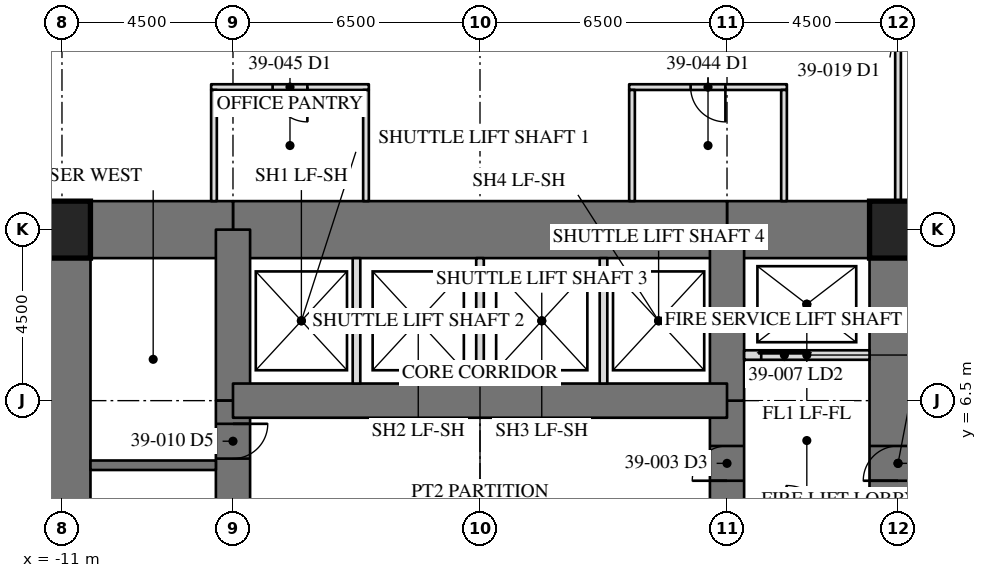
"""IFC4 building model, lengths in metres.
Left out: names, types, materials, properties, quantities, classifications, styles, units other than length and angle.
Written with IfcOpenShell. Run it as: python <this file> out.ifc"""

import sys

from ifc_helpers import new_model, si_unit, direction, frame, frame_2d, origin, origin_2d, place, context, subcontext, project, spatial, rectangle, hollow_rectangle, extrude, element, fill, save


model = new_model("IFC4")
c1 = context("Model", 3, precision=1e-05, world=origin(), true_north=direction((0.0, 1.0)))
c2 = subcontext(c1, "Body", "Model", "MODEL_VIEW")
j1 = project(units=[si_unit("LENGTHUNIT", "METRE"), si_unit("PLANEANGLEUNIT", "RADIAN")], contexts=[c1])
p1 = place(None, origin())
s1 = spatial("IfcSite", under=j1, at=p1, CompositionType="ELEMENT")
p2 = place(p1, origin())
s2 = spatial("IfcBuilding", under=s1, at=p2, CompositionType="ELEMENT")
p3 = place(p2, frame((0.0, 0.0, 166.4)))
s3 = spatial("IfcBuildingStorey", under=s2, at=p3, CompositionType="ELEMENT", Elevation=166.4)
p4 = place(p3, frame((11.0, -11.0, 0.0), z_axis=(0.0, 0.0, 1.0), x_axis=(0.0, 1.0, 0.0)))
e1 = element("IfcWall", 1, at=p4, inside=s3, PredefinedType="SHEAR", context=c2, shape_type="SweptSolid", body=[
    extrude(rectangle(XDim=22.0, YDim=1.5, at=frame_2d((11.0, 0.0))), origin(), (0.0, 0.0, 1.0), 4.1),
])
p5 = place(p4, frame((15.393, 0.0, 0.0)))
e2 = element("IfcOpeningElement", 2, at=p5, cuts=e1, PredefinedType="OPENING", context=c2, shape_type="SweptSolid", body=[
    extrude(rectangle(XDim=0.915, YDim=2.134, at=frame_2d((0.458, 1.067))), frame((0.0, 0.76, 0.0), z_axis=(0.0, -1.0, 0.0), x_axis=(1.0, 0.0, 0.0)), (0.0, 0.0, 1.0), 1.52),
])
p6 = place(p3, frame((-11.0, 11.0, 0.0), z_axis=(0.0, 0.0, 1.0), x_axis=(0.0, -1.0, 0.0)))
e3 = element("IfcWall", 3, at=p6, inside=s3, PredefinedType="SHEAR", context=c2, shape_type="SweptSolid", body=[
    extrude(rectangle(XDim=22.0, YDim=1.5, at=frame_2d((11.0, 0.0))), origin(), (0.0, 0.0, 1.0), 4.1),
])
p7 = place(p6, frame((15.393, 0.0, 0.0)))
e4 = element("IfcOpeningElement", 4, at=p7, cuts=e3, PredefinedType="OPENING", context=c2, shape_type="SweptSolid", body=[
    extrude(rectangle(XDim=0.915, YDim=2.134, at=frame_2d((0.458, 1.067))), frame((0.0, 0.76, 0.0), z_axis=(0.0, -1.0, 0.0), x_axis=(1.0, 0.0, 0.0)), (0.0, 0.0, 1.0), 1.52),
])
p8 = place(p3, frame((11.0, 11.0, 0.0), z_axis=(0.0, 0.0, 1.0), x_axis=(-1.0, 0.0, 0.0)))
e5 = element("IfcWall", 5, at=p8, inside=s3, PredefinedType="SHEAR", context=c2, shape_type="SweptSolid", body=[
    extrude(rectangle(XDim=4.5, YDim=1.5, at=frame_2d((2.25, 0.0))), origin(), (0.0, 0.0, 1.0), 4.1),
])
p9 = place(p3, frame((6.5, 11.0, 0.0), z_axis=(0.0, 0.0, 1.0), x_axis=(-1.0, 0.0, 0.0)))
e6 = element("IfcWall", 6, at=p9, inside=s3, PredefinedType="SHEAR", context=c2, shape_type="SweptSolid", body=[
    extrude(rectangle(XDim=13.0, YDim=1.5, at=frame_2d((6.5, 0.0))), origin(), (0.0, 0.0, 1.0), 4.1),
])
p10 = place(p3, frame((-6.5, 11.0, 0.0), z_axis=(0.0, 0.0, 1.0), x_axis=(-1.0, 0.0, 0.0)))
e7 = element("IfcWall", 7, at=p10, inside=s3, PredefinedType="SHEAR", context=c2, shape_type="SweptSolid", body=[
    extrude(rectangle(XDim=4.5, YDim=1.5, at=frame_2d((2.25, 0.0))), origin(), (0.0, 0.0, 1.0), 4.1),
])
p11 = place(p3, frame((6.5, -6.5, 0.0), z_axis=(0.0, 0.0, 1.0), x_axis=(0.0, 1.0, 0.0)))
e8 = element("IfcWall", 8, at=p11, inside=s3, PredefinedType="SHEAR", context=c2, shape_type="SweptSolid", body=[
    extrude(rectangle(XDim=13.0, YDim=0.9, at=frame_2d((6.5, 0.0))), origin(), (0.0, 0.0, 1.0), 4.1),
])
p12 = place(p11, frame((10.893, 0.0, 0.0)))
e9 = element("IfcOpeningElement", 9, at=p12, cuts=e8, PredefinedType="OPENING", context=c2, shape_type="SweptSolid", body=[
    extrude(rectangle(XDim=0.915, YDim=2.134, at=frame_2d((0.458, 1.067))), frame((0.0, 0.46, 0.0), z_axis=(0.0, -1.0, 0.0), x_axis=(1.0, 0.0, 0.0)), (0.0, 0.0, 1.0), 0.92),
])
p13 = place(p11, frame((0.61, 0.0, 0.0)))
e10 = element("IfcOpeningElement", 10, at=p13, cuts=e8, PredefinedType="OPENING", context=c2, shape_type="SweptSolid", body=[
    extrude(rectangle(XDim=0.915, YDim=2.134, at=frame_2d((0.458, 1.067))), frame((0.0, 0.46, 0.0), z_axis=(0.0, -1.0, 0.0), x_axis=(1.0, 0.0, 0.0)), (0.0, 0.0, 1.0), 0.92),
])
for number, where, z_axis, x_axis in (
    (11, (6.5, 6.5, 0.0), (0.0, 0.0, 1.0), (0.0, 1.0, 0.0)),
    (12, (-6.5, 11.0, 0.0), (0.0, 0.0, 1.0), (0.0, -1.0, 0.0)),
):
    element("IfcWall", number, at=place(p3, frame(where, z_axis=z_axis, x_axis=x_axis)), inside=s3, PredefinedType="SHEAR", context=c2, shape_type="SweptSolid", body=[
        extrude(rectangle(XDim=4.5, YDim=0.9, at=frame_2d((2.25, 0.0))), origin(), (0.0, 0.0, 1.0), 4.1),
    ])
p14 = place(p3, frame((-6.5, 6.5, 0.0), z_axis=(0.0, 0.0, 1.0), x_axis=(0.0, -1.0, 0.0)))
e13 = element("IfcWall", 13, at=p14, inside=s3, PredefinedType="SHEAR", context=c2, shape_type="SweptSolid", body=[
    extrude(rectangle(XDim=13.0, YDim=0.9, at=frame_2d((6.5, 0.0))), origin(), (0.0, 0.0, 1.0), 4.1),
])
p15 = place(p14, frame((10.893, 0.0, 0.0)))
e14 = element("IfcOpeningElement", 14, at=p15, cuts=e13, PredefinedType="OPENING", context=c2, shape_type="SweptSolid", body=[
    extrude(rectangle(XDim=0.915, YDim=2.134, at=frame_2d((0.458, 1.067))), frame((0.0, 0.46, 0.0), z_axis=(0.0, -1.0, 0.0), x_axis=(1.0, 0.0, 0.0)), (0.0, 0.0, 1.0), 0.92),
])
p16 = place(p14, frame((0.61, 0.0, 0.0)))
e15 = element("IfcOpeningElement", 15, at=p16, cuts=e13, PredefinedType="OPENING", context=c2, shape_type="SweptSolid", body=[
    extrude(rectangle(XDim=0.915, YDim=2.134, at=frame_2d((0.458, 1.067))), frame((0.0, 0.46, 0.0), z_axis=(0.0, -1.0, 0.0), x_axis=(1.0, 0.0, 0.0)), (0.0, 0.0, 1.0), 0.92),
])
p17 = place(p3, frame((6.5, 6.5, 0.0), z_axis=(0.0, 0.0, 1.0), x_axis=(-1.0, 0.0, 0.0)))
e16 = element("IfcWall", 16, at=p17, inside=s3, PredefinedType="SHEAR", context=c2, shape_type="SweptSolid", body=[
    extrude(rectangle(XDim=13.0, YDim=0.9, at=frame_2d((6.5, 0.0))), origin(), (0.0, 0.0, 1.0), 4.1),
])
for number, where, z_axis, x_axis in (
    (17, (11.0, 11.0, 0.0), (0.0, 0.0, 1.0), (1.0, 0.0, 0.0)),
    (18, (-11.0, 11.0, 0.0), (0.0, 0.0, 1.0), (1.0, 0.0, 0.0)),
):
    element("IfcColumn", number, at=place(p3, frame(where, z_axis=z_axis, x_axis=x_axis)), inside=s3, PredefinedType="COLUMN", context=c2, shape_type="SweptSolid", body=[
        extrude(hollow_rectangle(XDim=1.499, YDim=1.499, WallThickness=0.102, at=origin_2d()), origin(), (0.0, 0.0, 1.0), 4.1),
    ])
p18 = place(p3, frame((-6.95, 4.8, 0.0), z_axis=(0.0, 0.0, 1.0), x_axis=(-1.0, 0.0, 0.0)))
e19 = element("IfcWall", 19, at=p18, inside=s3, PredefinedType="SOLIDWALL", context=c2, shape_type="SweptSolid", body=[
    extrude(rectangle(XDim=3.3, YDim=0.25, at=frame_2d((1.65, 0.0))), origin(), (0.0, 0.0, 1.0), 3.91),
])
p19 = place(p3, frame((6.95, 7.7, 0.0), z_axis=(0.0, 0.0, 1.0), x_axis=(1.0, 0.0, 0.0)))
e20 = element("IfcWall", 20, at=p19, inside=s3, PredefinedType="PARTITIONING", context=c2, shape_type="SweptSolid", body=[
    extrude(rectangle(XDim=3.3, YDim=0.25, at=frame_2d((1.65, 0.0))), origin(), (0.0, 0.0, 1.0), 3.91),
])
p20 = place(p19, frame((0.45, 0.0, 0.0)))
e21 = element("IfcOpeningElement", 21, at=p20, cuts=e20, PredefinedType="OPENING", context=c2, shape_type="SweptSolid", body=[
    extrude(rectangle(XDim=1.219, YDim=2.134, at=frame_2d((0.609, 1.067))), frame((0.0, 0.135, 0.0), z_axis=(0.0, -1.0, 0.0), x_axis=(1.0, 0.0, 0.0)), (0.0, 0.0, 1.0), 0.27),
])
for number, where, z_axis, x_axis in (
    (22, (-3.25, 6.95, 0.0), (0.0, 0.0, 1.0), (0.0, 1.0, 0.0)),
    (23, (0.0, 6.95, 0.0), (0.0, 0.0, 1.0), (0.0, 1.0, 0.0)),
    (24, (3.25, 6.95, 0.0), (0.0, 0.0, 1.0), (0.0, 1.0, 0.0)),
):
    element("IfcWall", number, at=place(p3, frame(where, z_axis=z_axis, x_axis=x_axis)), inside=s3, PredefinedType="PARTITIONING", context=c2, shape_type="SweptSolid", body=[
        extrude(rectangle(XDim=3.3, YDim=0.2, at=frame_2d((1.65, 0.0))), origin(), (0.0, 0.0, 1.0), 3.91),
    ])
p21 = place(p3, frame((11.0, 11.75, 0.0), z_axis=(0.0, 0.0, 1.0), x_axis=(0.0, 1.0, 0.0)))
e25 = element("IfcWall", 25, at=p21, inside=s3, PredefinedType="PARTITIONING", context=c2, shape_type="SweptSolid", body=[
    extrude(rectangle(XDim=10.665, YDim=0.15, at=frame_2d((5.333, 0.0))), origin(), (0.0, 0.0, 1.0), 3.326),
])
p22 = place(p21, frame((4.518, 0.0, 0.0)))
e26 = element("IfcOpeningElement", 26, at=p22, cuts=e25, PredefinedType="OPENING", context=c2, shape_type="SweptSolid", body=[
    extrude(rectangle(XDim=0.915, YDim=2.134, at=frame_2d((0.458, 1.067))), frame((0.0, 0.085, 0.0), z_axis=(0.0, -1.0, 0.0), x_axis=(1.0, 0.0, 0.0)), (0.0, 0.0, 1.0), 0.17),
])
p23 = place(p3, frame((8.075, 14.75, 0.0), z_axis=(0.0, 0.0, 1.0), x_axis=(-1.0, 0.0, 0.0)))
e27 = element("IfcWall", 27, at=p23, inside=s3, PredefinedType="PARTITIONING", context=c2, shape_type="SweptSolid", body=[
    extrude(rectangle(XDim=4.15, YDim=0.15, at=frame_2d((2.075, 0.0))), origin(), (0.0, 0.0, 1.0), 3.91),
])
p24 = place(p23, frame((1.617, 0.0, 0.0)))
e28 = element("IfcOpeningElement", 28, at=p24, cuts=e27, PredefinedType="OPENING", context=c2, shape_type="SweptSolid", body=[
    extrude(rectangle(XDim=0.915, YDim=2.134, at=frame_2d((0.458, 1.067))), frame((0.0, 0.085, 0.0), z_axis=(0.0, -1.0, 0.0), x_axis=(1.0, 0.0, 0.0)), (0.0, 0.0, 1.0), 0.17),
])
for number, where, z_axis, x_axis in (
    (29, (8.0, 14.675, 0.0), (0.0, 0.0, 1.0), (0.0, -1.0, 0.0)),
    (30, (4.0, 14.675, 0.0), (0.0, 0.0, 1.0), (0.0, -1.0, 0.0)),
):
    element("IfcWall", number, at=place(p3, frame(where, z_axis=z_axis, x_axis=x_axis)), inside=s3, PredefinedType="PARTITIONING", context=c2, shape_type="SweptSolid", body=[
        extrude(rectangle(XDim=2.925, YDim=0.15, at=frame_2d((1.462, 0.0))), origin(), (0.0, 0.0, 1.0), 3.91),
    ])
p25 = place(p3, frame((-2.925, 14.75, 0.0), z_axis=(0.0, 0.0, 1.0), x_axis=(-1.0, 0.0, 0.0)))
e31 = element("IfcWall", 31, at=p25, inside=s3, PredefinedType="PARTITIONING", context=c2, shape_type="SweptSolid", body=[
    extrude(rectangle(XDim=4.15, YDim=0.15, at=frame_2d((2.075, 0.0))), origin(), (0.0, 0.0, 1.0), 3.91),
])
p26 = place(p25, frame((1.617, 0.0, 0.0)))
e32 = element("IfcOpeningElement", 32, at=p26, cuts=e31, PredefinedType="OPENING", context=c2, shape_type="SweptSolid", body=[
    extrude(rectangle(XDim=0.915, YDim=2.134, at=frame_2d((0.458, 1.067))), frame((0.0, 0.085, 0.0), z_axis=(0.0, -1.0, 0.0), x_axis=(1.0, 0.0, 0.0)), (0.0, 0.0, 1.0), 0.17),
])
for number, where, z_axis, x_axis in (
    (33, (-3.0, 14.675, 0.0), (0.0, 0.0, 1.0), (0.0, -1.0, 0.0)),
    (34, (-7.0, 14.675, 0.0), (0.0, 0.0, 1.0), (0.0, -1.0, 0.0)),
):
    element("IfcWall", number, at=place(p3, frame(where, z_axis=z_axis, x_axis=x_axis)), inside=s3, PredefinedType="PARTITIONING", context=c2, shape_type="SweptSolid", body=[
        extrude(rectangle(XDim=2.925, YDim=0.15, at=frame_2d((1.462, 0.0))), origin(), (0.0, 0.0, 1.0), 3.91),
    ])
p27 = place(p12, origin())
e35 = element("IfcDoor", 35, at=p27, inside=s3, OperationType="SINGLE_SWING_RIGHT", PredefinedType="DOOR", context=c2, shape_type="SweptSolid", body=[
    extrude(rectangle(XDim=0.915, YDim=2.134, at=frame_2d((0.458, 1.067))), frame((0.0, -0.375, 0.0), z_axis=(0.0, -1.0, 0.0), x_axis=(1.0, 0.0, 0.0)), (0.0, 0.0, 1.0), 0.05),
])
fill(e9, e35)
p28 = place(p20, origin())
e36 = element("IfcDoor", 36, at=p28, inside=s3, OperationType="SLIDING_TO_LEFT", PredefinedType="DOOR", context=c2, shape_type="SweptSolid", body=[
    extrude(rectangle(XDim=1.219, YDim=2.134, at=frame_2d((0.609, 1.067))), frame((0.0, 0.025, 0.0), z_axis=(0.0, -1.0, 0.0), x_axis=(1.0, 0.0, 0.0)), (0.0, 0.0, 1.0), 0.05),
])
fill(e21, e36)
p29 = place(p16, origin())
e37 = element("IfcDoor", 37, at=p29, inside=s3, OperationType="SINGLE_SWING_RIGHT", PredefinedType="DOOR", context=c2, shape_type="SweptSolid", body=[
    extrude(rectangle(XDim=0.915, YDim=2.134, at=frame_2d((0.458, 1.067))), frame((0.0, -0.375, 0.0), z_axis=(0.0, -1.0, 0.0), x_axis=(1.0, 0.0, 0.0)), (0.0, 0.0, 1.0), 0.05),
])
fill(e15, e37)
p30 = place(p24, origin())
e38 = element("IfcDoor", 38, at=p30, inside=s3, OperationType="SINGLE_SWING_LEFT", PredefinedType="DOOR", context=c2, shape_type="SweptSolid", body=[
    extrude(rectangle(XDim=0.915, YDim=2.134, at=frame_2d((0.458, 1.067))), frame((0.0, 0.025, 0.0), z_axis=(0.0, -1.0, 0.0), x_axis=(1.0, 0.0, 0.0)), (0.0, 0.0, 1.0), 0.05),
])
fill(e28, e38)
p31 = place(p26, origin())
e39 = element("IfcDoor", 39, at=p31, inside=s3, OperationType="SINGLE_SWING_LEFT", PredefinedType="DOOR", context=c2, shape_type="SweptSolid", body=[
    extrude(rectangle(XDim=0.915, YDim=2.134, at=frame_2d((0.458, 1.067))), frame((0.0, 0.025, 0.0), z_axis=(0.0, -1.0, 0.0), x_axis=(1.0, 0.0, 0.0)), (0.0, 0.0, 1.0), 0.05),
])
fill(e32, e39)
save(model, sys.argv[1])
